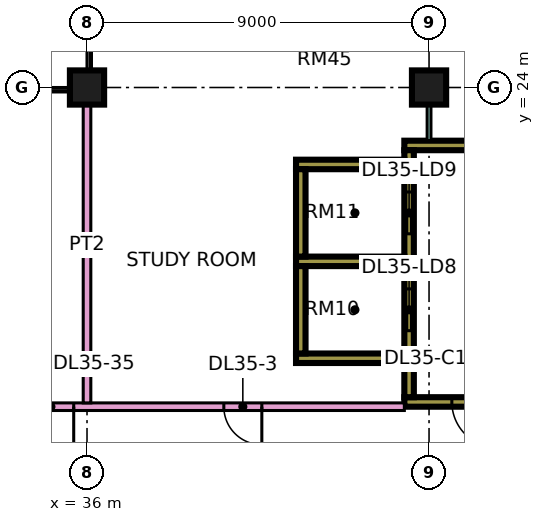
"""IFC4 building model, lengths in metres.
Left out: names, types, materials, properties, quantities, classifications, styles, units other than length and angle.
Written with IfcOpenShell. Run it as: python <this file> out.ifc"""

import sys

from ifc_helpers import new_model, si_unit, direction, frame, frame_2d, origin, origin_2d, place, context, subcontext, project, spatial, rectangle, extrude, element, fill, save


model = new_model("IFC4")
c1 = context("Model", 3, precision=1e-05, world=origin(), true_north=direction((0.0, 1.0)))
c2 = subcontext(c1, "Body", "Model", "MODEL_VIEW")
j1 = project(units=[si_unit("LENGTHUNIT", "METRE"), si_unit("PLANEANGLEUNIT", "RADIAN")], contexts=[c1])
p1 = place(None, origin())
s1 = spatial("IfcSite", under=j1, at=p1, CompositionType="ELEMENT")
p2 = place(p1, origin())
s2 = spatial("IfcBuilding", under=s1, at=p2, CompositionType="ELEMENT")
p3 = place(p2, frame((0.0, 0.0, 157.4)))
s3 = spatial("IfcBuildingStorey", under=s2, at=p3, CompositionType="ELEMENT", Elevation=157.4)
for number, where, z_axis, x_axis in (
    (1, (36.0, 24.0, 0.0), (0.0, 0.0, 1.0), (1.0, 0.0, 0.0)),
    (2, (45.0, 24.0, 0.0), (0.0, 0.0, 1.0), (1.0, 0.0, 0.0)),
):
    element("IfcColumn", number, at=place(p3, frame(where, z_axis=z_axis, x_axis=x_axis)), inside=s3, PredefinedType="COLUMN", context=c2, shape_type="SweptSolid", body=[
        extrude(rectangle(XDim=0.9, YDim=0.9, at=origin_2d()), origin(), (0.0, 0.0, 1.0), 3.75),
    ])
p4 = place(p3, frame((44.35, 15.725, 0.0), z_axis=(0.0, 0.0, 1.0), x_axis=(1.0, 0.0, 0.0)))
e3 = element("IfcWall", 3, at=p4, inside=s3, PredefinedType="SHEAR", context=c2, shape_type="SweptSolid", body=[
    extrude(rectangle(XDim=3.425, YDim=0.25, at=frame_2d((1.712, 0.0))), origin(), (0.0, 0.0, 1.0), 3.75),
])
p5 = place(p4, frame((1.25, 0.0, 0.0)))
e4 = element("IfcOpeningElement", 4, at=p5, cuts=e3, PredefinedType="OPENING", context=c2, shape_type="SweptSolid", body=[
    extrude(rectangle(XDim=1.2, YDim=2.2, at=frame_2d((0.6, 1.1))), frame((0.0, 0.135, 0.0), z_axis=(0.0, -1.0, 0.0), x_axis=(1.0, 0.0, 0.0)), (0.0, 0.0, 1.0), 0.27),
])
p6 = place(p3, frame((44.35, 22.475, 0.0), z_axis=(0.0, 0.0, 1.0), x_axis=(1.0, 0.0, 0.0)))
e5 = element("IfcWall", 5, at=p6, inside=s3, PredefinedType="SHEAR", context=c2, shape_type="SweptSolid", body=[
    extrude(rectangle(XDim=3.425, YDim=0.25, at=frame_2d((1.712, 0.0))), origin(), (0.0, 0.0, 1.0), 3.75),
])
p7 = place(p3, frame((44.475, 15.85, 0.0), z_axis=(0.0, 0.0, 1.0), x_axis=(0.0, 1.0, 0.0)))
e6 = element("IfcWall", 6, at=p7, inside=s3, PredefinedType="SHEAR", context=c2, shape_type="SweptSolid", body=[
    extrude(rectangle(XDim=6.5, YDim=0.25, at=frame_2d((3.25, 0.0))), origin(), (0.0, 0.0, 1.0), 3.75),
])
p8 = place(p7, frame((1.75, 0.0, 0.0)))
e7 = element("IfcOpeningElement", 7, at=p8, cuts=e6, PredefinedType="OPENING", context=c2, shape_type="SweptSolid", body=[
    extrude(rectangle(XDim=1.1, YDim=2.2, at=frame_2d((0.55, 1.1))), frame((0.0, 0.135, 0.0), z_axis=(0.0, -1.0, 0.0), x_axis=(1.0, 0.0, 0.0)), (0.0, 0.0, 1.0), 0.27),
])
p9 = place(p7, frame((4.3, 0.0, 0.0)))
e8 = element("IfcOpeningElement", 8, at=p9, cuts=e6, PredefinedType="OPENING", context=c2, shape_type="SweptSolid", body=[
    extrude(rectangle(XDim=1.1, YDim=2.2, at=frame_2d((0.55, 1.1))), frame((0.0, 0.135, 0.0), z_axis=(0.0, -1.0, 0.0), x_axis=(1.0, 0.0, 0.0)), (0.0, 0.0, 1.0), 0.27),
])
for number, where, z_axis, x_axis in (
    (9, (41.5, 16.875, 0.0), (0.0, 0.0, 1.0), (1.0, 0.0, 0.0)),
    (10, (41.5, 19.425, 0.0), (0.0, 0.0, 1.0), (1.0, 0.0, 0.0)),
    (11, (41.5, 21.975, 0.0), (0.0, 0.0, 1.0), (1.0, 0.0, 0.0)),
):
    element("IfcWall", number, at=place(p3, frame(where, z_axis=z_axis, x_axis=x_axis)), inside=s3, PredefinedType="SHEAR", context=c2, shape_type="SweptSolid", body=[
        extrude(rectangle(XDim=2.85, YDim=0.25, at=frame_2d((1.425, 0.0))), origin(), (0.0, 0.0, 1.0), 3.75),
    ])
for number, where, z_axis, x_axis in (
    (12, (41.625, 17.0, 0.0), (0.0, 0.0, 1.0), (0.0, 1.0, 0.0)),
    (13, (41.625, 19.55, 0.0), (0.0, 0.0, 1.0), (0.0, 1.0, 0.0)),
):
    element("IfcWall", number, at=place(p3, frame(where, z_axis=z_axis, x_axis=x_axis)), inside=s3, PredefinedType="SHEAR", context=c2, shape_type="SweptSolid", body=[
        extrude(rectangle(XDim=2.3, YDim=0.25, at=frame_2d((1.15, 0.0))), origin(), (0.0, 0.0, 1.0), 3.75),
    ])
p10 = place(p3, frame((34.0, 15.6, 0.0), z_axis=(0.0, 0.0, 1.0), x_axis=(1.0, 0.0, 0.0)))
e14 = element("IfcWall", 14, at=p10, inside=s3, PredefinedType="PARTITIONING", context=c2, shape_type="SweptSolid", body=[
    extrude(rectangle(XDim=10.35, YDim=0.2, at=frame_2d((5.175, 0.0))), origin(), (0.0, 0.0, 1.0), 3.35),
])
p11 = place(p10, frame((5.6, 0.0, 0.0)))
e15 = element("IfcOpeningElement", 15, at=p11, cuts=e14, PredefinedType="OPENING", context=c2, shape_type="SweptSolid", body=[
    extrude(rectangle(XDim=1.0, YDim=2.1, at=frame_2d((0.5, 1.05))), frame((0.0, 0.11, 0.0), z_axis=(0.0, -1.0, 0.0), x_axis=(1.0, 0.0, 0.0)), (0.0, 0.0, 1.0), 0.22),
])
p12 = place(p10, frame((0.45, 0.0, 0.0)))
e16 = element("IfcOpeningElement", 16, at=p12, cuts=e14, PredefinedType="OPENING", context=c2, shape_type="SweptSolid", body=[
    extrude(rectangle(XDim=1.2, YDim=2.1, at=frame_2d((0.6, 1.05))), frame((0.0, 0.11, 0.0), z_axis=(0.0, -1.0, 0.0), x_axis=(1.0, 0.0, 0.0)), (0.0, 0.0, 1.0), 0.22),
])
p13 = place(p3, frame((36.0, 15.7, 0.0), z_axis=(0.0, 0.0, 1.0), x_axis=(0.0, 1.0, 0.0)))
e17 = element("IfcWall", 17, at=p13, inside=s3, PredefinedType="PARTITIONING", context=c2, shape_type="SweptSolid", body=[
    extrude(rectangle(XDim=8.3, YDim=0.2, at=frame_2d((4.15, 0.0))), origin(), (0.0, 0.0, 1.0), 3.35),
])
p14 = place(p3, frame((45.0, 22.6, 0.0), z_axis=(0.0, 0.0, 1.0), x_axis=(0.0, 1.0, 0.0)))
e18 = element("IfcWall", 18, at=p14, inside=s3, PredefinedType="PARTITIONING", context=c2, shape_type="SweptSolid", body=[
    extrude(rectangle(XDim=1.4, YDim=0.1, at=frame_2d((0.7, 0.0))), origin(), (0.0, 0.0, 1.0), 3.35),
])
p15 = place(p5, origin())
e19 = element("IfcDoor", 19, at=p15, inside=s3, OperationType="SINGLE_SWING_RIGHT", PredefinedType="DOOR", context=c2, shape_type="SweptSolid", body=[
    extrude(rectangle(XDim=1.2, YDim=2.2, at=frame_2d((0.6, 1.1))), frame((0.0, 0.025, 0.0), z_axis=(0.0, -1.0, 0.0), x_axis=(1.0, 0.0, 0.0)), (0.0, 0.0, 1.0), 0.05),
])
fill(e4, e19)
p16 = place(p8, origin())
e20 = element("IfcDoor", 20, at=p16, inside=s3, OperationType="DOUBLE_DOOR_SLIDING", PredefinedType="DOOR", context=c2, shape_type="SweptSolid", body=[
    extrude(rectangle(XDim=1.1, YDim=2.2, at=frame_2d((0.55, 1.1))), frame((0.0, 0.025, 0.0), z_axis=(0.0, -1.0, 0.0), x_axis=(1.0, 0.0, 0.0)), (0.0, 0.0, 1.0), 0.05),
])
fill(e7, e20)
p17 = place(p9, origin())
e21 = element("IfcDoor", 21, at=p17, inside=s3, OperationType="DOUBLE_DOOR_SLIDING", PredefinedType="DOOR", context=c2, shape_type="SweptSolid", body=[
    extrude(rectangle(XDim=1.1, YDim=2.2, at=frame_2d((0.55, 1.1))), frame((0.0, 0.025, 0.0), z_axis=(0.0, -1.0, 0.0), x_axis=(1.0, 0.0, 0.0)), (0.0, 0.0, 1.0), 0.05),
])
fill(e8, e21)
p18 = place(p11, origin())
e22 = element("IfcDoor", 22, at=p18, inside=s3, OperationType="SINGLE_SWING_RIGHT", PredefinedType="DOOR", context=c2, shape_type="SweptSolid", body=[
    extrude(rectangle(XDim=1.0, YDim=2.1, at=frame_2d((0.5, 1.05))), frame((0.0, 0.025, 0.0), z_axis=(0.0, -1.0, 0.0), x_axis=(1.0, 0.0, 0.0)), (0.0, 0.0, 1.0), 0.05),
])
fill(e15, e22)
p19 = place(p12, origin())
e23 = element("IfcDoor", 23, at=p19, inside=s3, OperationType="SINGLE_SWING_RIGHT", PredefinedType="DOOR", context=c2, shape_type="SweptSolid", body=[
    extrude(rectangle(XDim=1.2, YDim=2.1, at=frame_2d((0.6, 1.05))), frame((0.0, 0.025, 0.0), z_axis=(0.0, -1.0, 0.0), x_axis=(1.0, 0.0, 0.0)), (0.0, 0.0, 1.0), 0.05),
])
fill(e16, e23)
save(model, sys.argv[1])
